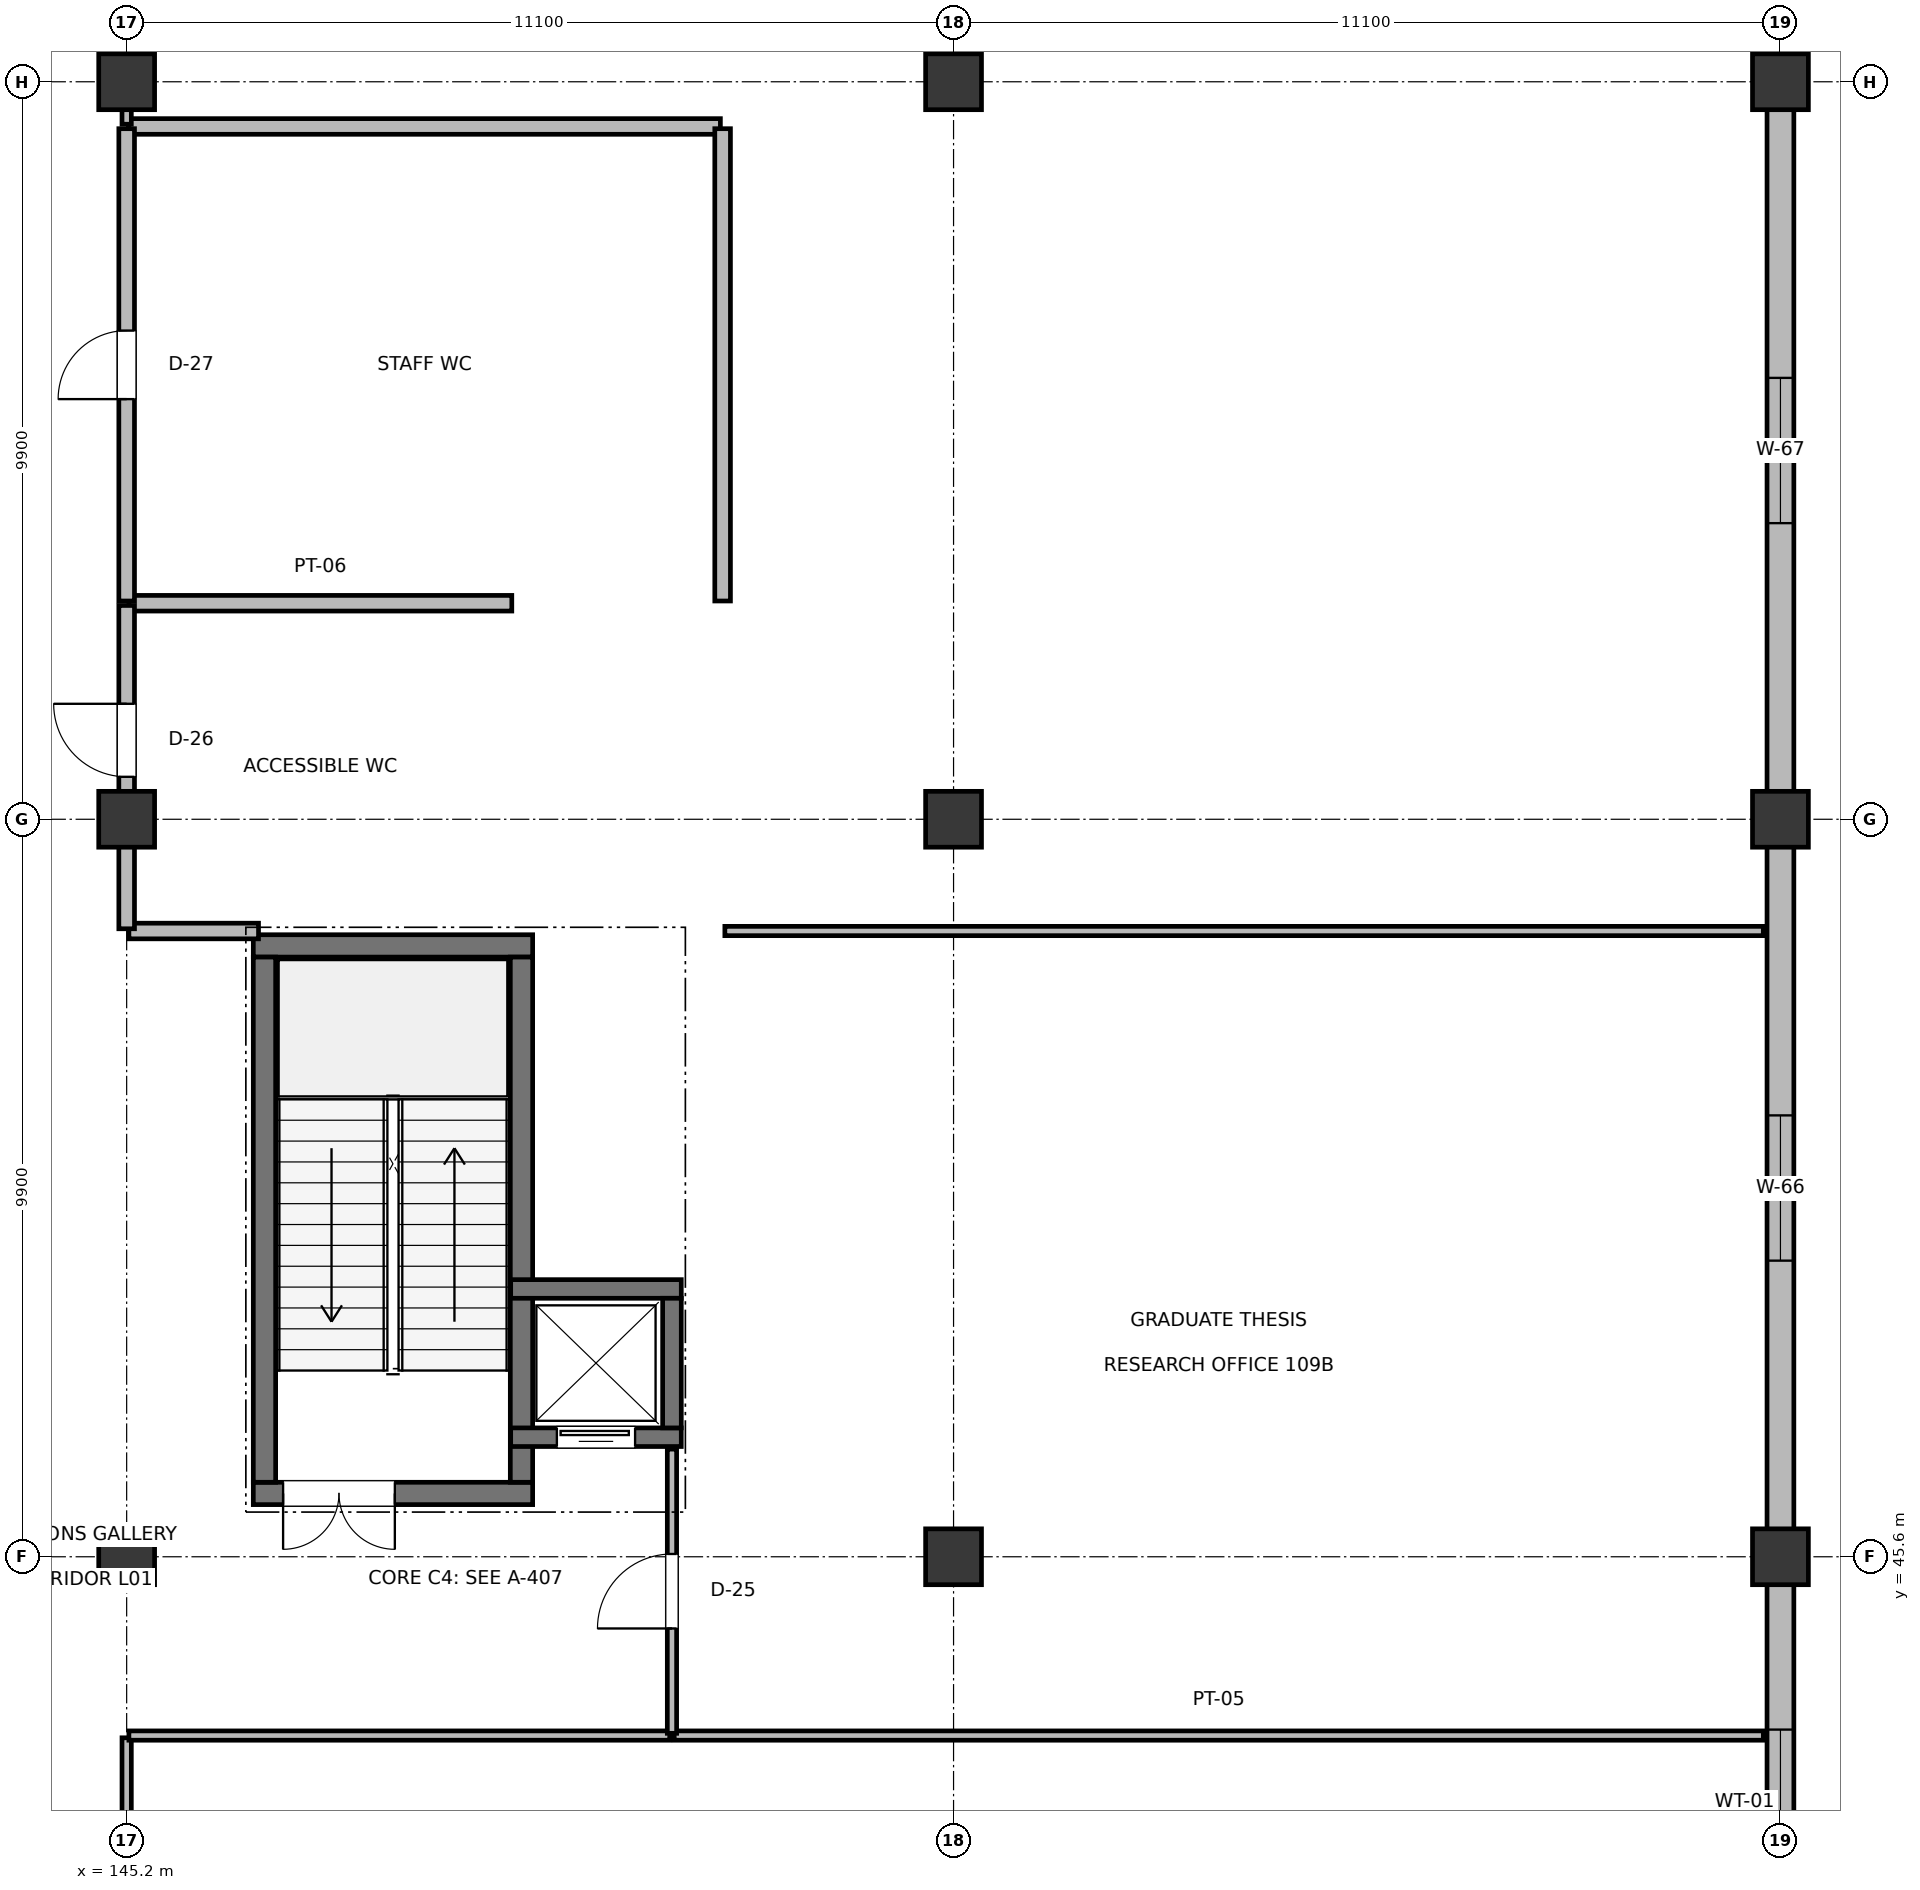
"""IFC4 building model, lengths in metres.
Left out: names, types, materials, properties, quantities, classifications, styles, units other than length and angle.
Written with IfcOpenShell. Run it as: python <this file> out.ifc"""

import sys

from ifc_helpers import new_model, si_unit, direction, frame, frame_2d, origin, origin_2d, place, context, subcontext, project, spatial, rectangle, extrude, element, fill, save


model = new_model("IFC4")
c1 = context("Model", 3, precision=1e-05, world=origin(), true_north=direction((0.0, 1.0)))
c2 = subcontext(c1, "Body", "Model", "MODEL_VIEW")
j1 = project(units=[si_unit("LENGTHUNIT", "METRE"), si_unit("PLANEANGLEUNIT", "RADIAN")], contexts=[c1])
p1 = place(None, origin())
s1 = spatial("IfcSite", under=j1, at=p1, CompositionType="ELEMENT")
p2 = place(p1, origin())
s2 = spatial("IfcBuilding", under=s1, at=p2, CompositionType="ELEMENT")
p3 = place(p2, frame((0.0, 0.0, 5.4)))
s3 = spatial("IfcBuildingStorey", under=s2, at=p3, CompositionType="ELEMENT", Elevation=5.4)
for number, where, z_axis, x_axis in (
    (1, (145.2, 45.6, 0.0), (0.0, 0.0, 1.0), (1.0, 0.0, 0.0)),
    (2, (145.2, 55.5, 0.0), (0.0, 0.0, 1.0), (1.0, 0.0, 0.0)),
    (3, (145.2, 65.4, 0.0), (0.0, 0.0, 1.0), (1.0, 0.0, 0.0)),
    (4, (156.3, 45.6, 0.0), (0.0, 0.0, 1.0), (1.0, 0.0, 0.0)),
    (5, (156.3, 55.5, 0.0), (0.0, 0.0, 1.0), (1.0, 0.0, 0.0)),
    (6, (156.3, 65.4, 0.0), (0.0, 0.0, 1.0), (1.0, 0.0, 0.0)),
    (7, (167.4, 45.6, 0.0), (0.0, 0.0, 1.0), (1.0, 0.0, 0.0)),
    (8, (167.4, 55.5, 0.0), (0.0, 0.0, 1.0), (1.0, 0.0, 0.0)),
    (9, (167.4, 65.4, 0.0), (0.0, 0.0, 1.0), (1.0, 0.0, 0.0)),
):
    element("IfcColumn", number, at=place(p3, frame(where, z_axis=z_axis, x_axis=x_axis)), inside=s3, PredefinedType="COLUMN", context=c2, shape_type="SweptSolid", body=[
        extrude(rectangle(XDim=0.75, YDim=0.75, at=origin_2d()), origin(), (0.0, 0.0, 1.0), 4.8),
    ])
p4 = place(p3, frame((167.4, 39.365, 0.0), z_axis=(0.0, 0.0, 1.0), x_axis=(0.0, 1.0, 0.0)))
e10 = element("IfcWall", 10, at=p4, inside=s3, PredefinedType="SOLIDWALL", context=c2, shape_type="SweptSolid", body=[
    extrude(rectangle(XDim=5.88, YDim=0.36, at=frame_2d((2.94, 0.0))), origin(), (0.0, 0.0, 1.0), 3.775),
])
p5 = place(p4, frame((1.965, 0.0, 0.85)))
e11 = element("IfcOpeningElement", 11, at=p5, cuts=e10, PredefinedType="OPENING", context=c2, shape_type="SweptSolid", body=[
    extrude(rectangle(XDim=1.95, YDim=1.15, at=frame_2d((0.975, 0.575))), frame((0.0, 0.19, 0.0), z_axis=(0.0, -1.0, 0.0), x_axis=(1.0, 0.0, 0.0)), (0.0, 0.0, 1.0), 0.38),
])
p6 = place(p3, frame((167.4, 45.965, 0.0), z_axis=(0.0, 0.0, 1.0), x_axis=(0.0, 1.0, 0.0)))
e12 = element("IfcWall", 12, at=p6, inside=s3, PredefinedType="SOLIDWALL", context=c2, shape_type="SweptSolid", body=[
    extrude(rectangle(XDim=9.17, YDim=0.36, at=frame_2d((4.585, 0.0))), origin(), (0.0, 0.0, 1.0), 3.775),
])
p7 = place(p6, frame((3.61, 0.0, 0.85)))
e13 = element("IfcOpeningElement", 13, at=p7, cuts=e12, PredefinedType="OPENING", context=c2, shape_type="SweptSolid", body=[
    extrude(rectangle(XDim=1.95, YDim=1.35, at=frame_2d((0.975, 0.675))), frame((0.0, 0.19, 0.0), z_axis=(0.0, -1.0, 0.0), x_axis=(1.0, 0.0, 0.0)), (0.0, 0.0, 1.0), 0.38),
])
p8 = place(p3, frame((167.4, 55.865, 0.0), z_axis=(0.0, 0.0, 1.0), x_axis=(0.0, 1.0, 0.0)))
e14 = element("IfcWall", 14, at=p8, inside=s3, PredefinedType="SOLIDWALL", context=c2, shape_type="SweptSolid", body=[
    extrude(rectangle(XDim=9.17, YDim=0.36, at=frame_2d((4.585, 0.0))), origin(), (0.0, 0.0, 1.0), 3.775),
])
p9 = place(p8, frame((3.61, 0.0, 0.85)))
e15 = element("IfcOpeningElement", 15, at=p9, cuts=e14, PredefinedType="OPENING", context=c2, shape_type="SweptSolid", body=[
    extrude(rectangle(XDim=1.95, YDim=1.55, at=frame_2d((0.975, 0.775))), frame((0.0, 0.19, 0.0), z_axis=(0.0, -1.0, 0.0), x_axis=(1.0, 0.0, 0.0)), (0.0, 0.0, 1.0), 0.38),
])
p10 = place(p3, frame((167.4, 65.765, 0.0), z_axis=(0.0, 0.0, 1.0), x_axis=(0.0, 1.0, 0.0)))
e16 = element("IfcWall", 16, at=p10, inside=s3, PredefinedType="SOLIDWALL", context=c2, shape_type="SweptSolid", body=[
    extrude(rectangle(XDim=10.07, YDim=0.36, at=frame_2d((5.035, 0.0))), origin(), (0.0, 0.0, 1.0), 3.775),
])
p11 = place(p10, frame((4.06, 0.0, 0.85)))
e17 = element("IfcOpeningElement", 17, at=p11, cuts=e16, PredefinedType="OPENING", context=c2, shape_type="SweptSolid", body=[
    extrude(rectangle(XDim=1.95, YDim=1.75, at=frame_2d((0.975, 0.875))), frame((0.0, 0.19, 0.0), z_axis=(0.0, -1.0, 0.0), x_axis=(1.0, 0.0, 0.0)), (0.0, 0.0, 1.0), 0.38),
])
p12 = place(p3, frame((146.9, 46.45, 0.0), z_axis=(0.0, 0.0, 1.0), x_axis=(1.0, 0.0, 0.0)))
e18 = element("IfcWall", 18, at=p12, inside=s3, PredefinedType="SHEAR", context=c2, shape_type="SweptSolid", body=[
    extrude(rectangle(XDim=3.75, YDim=0.3, at=frame_2d((1.875, 0.0))), origin(), (0.0, 0.0, 1.0), 4.58),
])
p13 = place(p12, frame((0.4, 0.0, 0.0)))
e19 = element("IfcOpeningElement", 19, at=p13, cuts=e18, PredefinedType="OPENING", context=c2, shape_type="SweptSolid", body=[
    extrude(rectangle(XDim=1.5, YDim=2.2, at=frame_2d((0.75, 1.1))), frame((0.0, 0.16, 0.0), z_axis=(0.0, -1.0, 0.0), x_axis=(1.0, 0.0, 0.0)), (0.0, 0.0, 1.0), 0.32),
])
p14 = place(p3, frame((146.9, 53.8, 0.0), z_axis=(0.0, 0.0, 1.0), x_axis=(1.0, 0.0, 0.0)))
e20 = element("IfcWall", 20, at=p14, inside=s3, PredefinedType="SHEAR", context=c2, shape_type="SweptSolid", body=[
    extrude(rectangle(XDim=3.75, YDim=0.3, at=frame_2d((1.875, 0.0))), origin(), (0.0, 0.0, 1.0), 4.58),
])
for number, where, z_axis, x_axis in (
    (21, (147.05, 46.6, 0.0), (0.0, 0.0, 1.0), (0.0, 1.0, 0.0)),
    (22, (150.5, 46.6, 0.0), (0.0, 0.0, 1.0), (0.0, 1.0, 0.0)),
):
    element("IfcWall", number, at=place(p3, frame(where, z_axis=z_axis, x_axis=x_axis)), inside=s3, PredefinedType="SHEAR", context=c2, shape_type="SweptSolid", body=[
        extrude(rectangle(XDim=7.05, YDim=0.3, at=frame_2d((3.525, 0.0))), origin(), (0.0, 0.0, 1.0), 4.58),
    ])
p15 = place(p3, frame((150.355, 47.205, 0.0), z_axis=(0.0, 0.0, 1.0), x_axis=(1.0, 0.0, 0.0)))
e23 = element("IfcWall", 23, at=p15, inside=s3, PredefinedType="SHEAR", context=c2, shape_type="SweptSolid", body=[
    extrude(rectangle(XDim=2.29, YDim=0.25, at=frame_2d((1.145, 0.0))), origin(), (0.0, 0.0, 1.0), 4.56),
])
p16 = place(p15, frame((0.62, 0.0, 0.0)))
e24 = element("IfcOpeningElement", 24, at=p16, cuts=e23, PredefinedType="OPENING", context=c2, shape_type="SweptSolid", body=[
    extrude(rectangle(XDim=1.05, YDim=2.15, at=frame_2d((0.525, 1.075))), frame((0.0, 0.135, 0.0), z_axis=(0.0, -1.0, 0.0), x_axis=(1.0, 0.0, 0.0)), (0.0, 0.0, 1.0), 0.27),
])
p17 = place(p3, frame((150.355, 49.195, 0.0), z_axis=(0.0, 0.0, 1.0), x_axis=(1.0, 0.0, 0.0)))
e25 = element("IfcWall", 25, at=p17, inside=s3, PredefinedType="SHEAR", context=c2, shape_type="SweptSolid", body=[
    extrude(rectangle(XDim=2.29, YDim=0.25, at=frame_2d((1.145, 0.0))), origin(), (0.0, 0.0, 1.0), 4.56),
])
p18 = place(p3, frame((152.52, 47.33, 0.0), z_axis=(0.0, 0.0, 1.0), x_axis=(0.0, 1.0, 0.0)))
e26 = element("IfcWall", 26, at=p18, inside=s3, PredefinedType="SHEAR", context=c2, shape_type="SweptSolid", body=[
    extrude(rectangle(XDim=1.74, YDim=0.25, at=frame_2d((0.87, 0.0))), origin(), (0.0, 0.0, 1.0), 4.56),
])
p19 = place(p3, frame((152.55, 43.2, 0.0), z_axis=(0.0, 0.0, 1.0), x_axis=(1.0, 0.0, 0.0)))
e27 = element("IfcWall", 27, at=p19, inside=s3, PredefinedType="PARTITIONING", context=c2, shape_type="SweptSolid", body=[
    extrude(rectangle(XDim=14.62, YDim=0.125, at=frame_2d((7.31, 0.0))), origin(), (0.0, 0.0, 1.0), 3.775),
])
p20 = place(p3, frame((145.2, 12.23, 0.0), z_axis=(0.0, 0.0, 1.0), x_axis=(0.0, 1.0, 0.0)))
e28 = element("IfcWall", 28, at=p20, inside=s3, PredefinedType="PARTITIONING", context=c2, shape_type="SweptSolid", body=[
    extrude(rectangle(XDim=30.94, YDim=0.125, at=frame_2d((15.47, 0.0))), origin(), (0.0, 0.0, 1.0), 3.625),
])
p21 = place(p20, frame((14.97, 0.0, 0.0)))
e29 = element("IfcOpeningElement", 29, at=p21, cuts=e28, PredefinedType="OPENING", context=c2, shape_type="SweptSolid", body=[
    extrude(rectangle(XDim=1.0, YDim=2.15, at=frame_2d((0.5, 1.075))), frame((0.0, 0.073, 0.0), z_axis=(0.0, -1.0, 0.0), x_axis=(1.0, 0.0, 0.0)), (0.0, 0.0, 1.0), 0.145),
])
p22 = place(p3, frame((145.23, 43.2, 0.0), z_axis=(0.0, 0.0, 1.0), x_axis=(1.0, 0.0, 0.0)))
e30 = element("IfcWall", 30, at=p22, inside=s3, PredefinedType="PARTITIONING", context=c2, shape_type="SweptSolid", body=[
    extrude(rectangle(XDim=7.26, YDim=0.125, at=frame_2d((3.63, 0.0))), origin(), (0.0, 0.0, 1.0), 3.825),
])
p23 = place(p3, frame((153.23, 54.0, 0.0), z_axis=(0.0, 0.0, 1.0), x_axis=(1.0, 0.0, 0.0)))
e31 = element("IfcWall", 31, at=p23, inside=s3, PredefinedType="PARTITIONING", context=c2, shape_type="SweptSolid", body=[
    extrude(rectangle(XDim=13.94, YDim=0.125, at=frame_2d((6.97, 0.0))), origin(), (0.0, 0.0, 1.0), 3.625),
])
p24 = place(p3, frame((152.52, 43.23, 0.0), z_axis=(0.0, 0.0, 1.0), x_axis=(0.0, 1.0, 0.0)))
e32 = element("IfcWall", 32, at=p24, inside=s3, PredefinedType="PARTITIONING", context=c2, shape_type="SweptSolid", body=[
    extrude(rectangle(XDim=3.815, YDim=0.125, at=frame_2d((1.907, 0.0))), origin(), (0.0, 0.0, 1.0), 3.695),
])
p25 = place(p24, frame((1.407, 0.0, 0.0)))
e33 = element("IfcOpeningElement", 33, at=p25, cuts=e32, PredefinedType="OPENING", context=c2, shape_type="SweptSolid", body=[
    extrude(rectangle(XDim=1.0, YDim=2.15, at=frame_2d((0.5, 1.075))), frame((0.0, 0.073, 0.0), z_axis=(0.0, -1.0, 0.0), x_axis=(1.0, 0.0, 0.0)), (0.0, 0.0, 1.0), 0.145),
])
p26 = place(p3, frame((145.23, 58.4, 0.0), z_axis=(0.0, 0.0, 1.0), x_axis=(1.0, 0.0, 0.0)))
e34 = element("IfcWall", 34, at=p26, inside=s3, PredefinedType="PLUMBINGWALL", context=c2, shape_type="SweptSolid", body=[
    extrude(rectangle(XDim=5.14, YDim=0.21, at=frame_2d((2.57, 0.0))), origin(), (0.0, 0.0, 1.0), 3.625),
])
p27 = place(p3, frame((145.23, 54.0, 0.0), z_axis=(0.0, 0.0, 1.0), x_axis=(1.0, 0.0, 0.0)))
e35 = element("IfcWall", 35, at=p27, inside=s3, PredefinedType="PLUMBINGWALL", context=c2, shape_type="SweptSolid", body=[
    extrude(rectangle(XDim=1.74, YDim=0.21, at=frame_2d((0.87, 0.0))), origin(), (0.0, 0.0, 1.0), 3.625),
])
p28 = place(p3, frame((145.2, 54.03, 0.0), z_axis=(0.0, 0.0, 1.0), x_axis=(0.0, 1.0, 0.0)))
e36 = element("IfcWall", 36, at=p28, inside=s3, PredefinedType="PLUMBINGWALL", context=c2, shape_type="SweptSolid", body=[
    extrude(rectangle(XDim=4.34, YDim=0.21, at=frame_2d((2.17, 0.0))), origin(), (0.0, 0.0, 1.0), 3.625),
])
p29 = place(p28, frame((2.04, 0.0, 0.0)))
e37 = element("IfcOpeningElement", 37, at=p29, cuts=e36, PredefinedType="OPENING", context=c2, shape_type="SweptSolid", body=[
    extrude(rectangle(XDim=0.98, YDim=2.1, at=frame_2d((0.49, 1.05))), frame((0.0, 0.115, 0.0), z_axis=(0.0, -1.0, 0.0), x_axis=(1.0, 0.0, 0.0)), (0.0, 0.0, 1.0), 0.23),
])
p30 = place(p3, frame((145.23, 64.8, 0.0), z_axis=(0.0, 0.0, 1.0), x_axis=(1.0, 0.0, 0.0)))
e38 = element("IfcWall", 38, at=p30, inside=s3, PredefinedType="PLUMBINGWALL", context=c2, shape_type="SweptSolid", body=[
    extrude(rectangle(XDim=7.94, YDim=0.21, at=frame_2d((3.97, 0.0))), origin(), (0.0, 0.0, 1.0), 3.625),
])
p31 = place(p3, frame((153.2, 58.43, 0.0), z_axis=(0.0, 0.0, 1.0), x_axis=(0.0, 1.0, 0.0)))
e39 = element("IfcWall", 39, at=p31, inside=s3, PredefinedType="PLUMBINGWALL", context=c2, shape_type="SweptSolid", body=[
    extrude(rectangle(XDim=6.34, YDim=0.21, at=frame_2d((3.17, 0.0))), origin(), (0.0, 0.0, 1.0), 4.48),
])
p32 = place(p3, frame((145.2, 58.43, 0.0), z_axis=(0.0, 0.0, 1.0), x_axis=(0.0, 1.0, 0.0)))
e40 = element("IfcWall", 40, at=p32, inside=s3, PredefinedType="PLUMBINGWALL", context=c2, shape_type="SweptSolid", body=[
    extrude(rectangle(XDim=6.34, YDim=0.21, at=frame_2d((3.17, 0.0))), origin(), (0.0, 0.0, 1.0), 3.625),
])
p33 = place(p32, frame((2.71, 0.0, 0.0)))
e41 = element("IfcOpeningElement", 41, at=p33, cuts=e40, PredefinedType="OPENING", context=c2, shape_type="SweptSolid", body=[
    extrude(rectangle(XDim=0.92, YDim=2.1, at=frame_2d((0.46, 1.05))), frame((0.0, 0.115, 0.0), z_axis=(0.0, -1.0, 0.0), x_axis=(1.0, 0.0, 0.0)), (0.0, 0.0, 1.0), 0.23),
])
p34 = place(p3, frame((145.2, 64.83, 0.0), z_axis=(0.0, 0.0, 1.0), x_axis=(0.0, 1.0, 0.0)))
e42 = element("IfcWall", 42, at=p34, inside=s3, PredefinedType="PARTITIONING", context=c2, shape_type="SweptSolid", body=[
    extrude(rectangle(XDim=11.14, YDim=0.125, at=frame_2d((5.57, 0.0))), origin(), (0.0, 0.0, 1.0), 3.625),
])
p35 = place(p34, frame((5.03, 0.0, 0.0)))
e43 = element("IfcOpeningElement", 43, at=p35, cuts=e42, PredefinedType="OPENING", context=c2, shape_type="SweptSolid", body=[
    extrude(rectangle(XDim=1.08, YDim=2.15, at=frame_2d((0.54, 1.075))), frame((0.0, 0.073, 0.0), z_axis=(0.0, -1.0, 0.0), x_axis=(1.0, 0.0, 0.0)), (0.0, 0.0, 1.0), 0.145),
])
p36 = place(p5, frame((1.95, 0.0, 0.0), z_axis=(0.0, 0.0, 1.0), x_axis=(-1.0, 0.0, 0.0)))
e44 = element("IfcWindow", 44, at=p36, inside=s3, PartitioningType="DOUBLE_PANEL_VERTICAL", PredefinedType="WINDOW", context=c2, shape_type="SweptSolid", body=[
    extrude(rectangle(XDim=1.95, YDim=1.15, at=frame_2d((0.975, 0.575))), frame((0.0, 0.03, 0.0), z_axis=(0.0, -1.0, 0.0), x_axis=(1.0, 0.0, 0.0)), (0.0, 0.0, 1.0), 0.06),
])
fill(e11, e44)
p37 = place(p7, frame((1.95, 0.0, 0.0), z_axis=(0.0, 0.0, 1.0), x_axis=(-1.0, 0.0, 0.0)))
e45 = element("IfcWindow", 45, at=p37, inside=s3, PartitioningType="DOUBLE_PANEL_VERTICAL", PredefinedType="WINDOW", context=c2, shape_type="SweptSolid", body=[
    extrude(rectangle(XDim=1.95, YDim=1.35, at=frame_2d((0.975, 0.675))), frame((0.0, 0.03, 0.0), z_axis=(0.0, -1.0, 0.0), x_axis=(1.0, 0.0, 0.0)), (0.0, 0.0, 1.0), 0.06),
])
fill(e13, e45)
p38 = place(p9, frame((1.95, 0.0, 0.0), z_axis=(0.0, 0.0, 1.0), x_axis=(-1.0, 0.0, 0.0)))
e46 = element("IfcWindow", 46, at=p38, inside=s3, PartitioningType="DOUBLE_PANEL_VERTICAL", PredefinedType="WINDOW", context=c2, shape_type="SweptSolid", body=[
    extrude(rectangle(XDim=1.95, YDim=1.55, at=frame_2d((0.975, 0.775))), frame((0.0, 0.03, 0.0), z_axis=(0.0, -1.0, 0.0), x_axis=(1.0, 0.0, 0.0)), (0.0, 0.0, 1.0), 0.06),
])
fill(e15, e46)
p39 = place(p13, frame((1.5, 0.0, 0.0), z_axis=(0.0, 0.0, 1.0), x_axis=(-1.0, 0.0, 0.0)))
e47 = element("IfcDoor", 47, at=p39, inside=s3, OperationType="DOUBLE_DOOR_SINGLE_SWING", PredefinedType="DOOR", context=c2, shape_type="SweptSolid", body=[
    extrude(rectangle(XDim=1.5, YDim=2.2, at=frame_2d((0.75, 1.1))), frame((0.0, 0.025, 0.0), z_axis=(0.0, -1.0, 0.0), x_axis=(1.0, 0.0, 0.0)), (0.0, 0.0, 1.0), 0.05),
])
fill(e19, e47)
p40 = place(p16, frame((1.05, 0.0, 0.0), z_axis=(0.0, 0.0, 1.0), x_axis=(-1.0, 0.0, 0.0)))
e48 = element("IfcDoor", 48, at=p40, inside=s3, OperationType="SLIDING_TO_RIGHT", PredefinedType="DOOR", context=c2, shape_type="SweptSolid", body=[
    extrude(rectangle(XDim=1.05, YDim=2.15, at=frame_2d((0.525, 1.075))), frame((0.0, 0.025, 0.0), z_axis=(0.0, -1.0, 0.0), x_axis=(1.0, 0.0, 0.0)), (0.0, 0.0, 1.0), 0.05),
])
fill(e24, e48)
p41 = place(p25, origin())
e49 = element("IfcDoor", 49, at=p41, inside=s3, OperationType="SINGLE_SWING_LEFT", PredefinedType="DOOR", context=c2, shape_type="SweptSolid", body=[
    extrude(rectangle(XDim=1.0, YDim=2.15, at=frame_2d((0.5, 1.075))), frame((0.0, 0.025, 0.0), z_axis=(0.0, -1.0, 0.0), x_axis=(1.0, 0.0, 0.0)), (0.0, 0.0, 1.0), 0.05),
])
fill(e33, e49)
p42 = place(p29, origin())
e50 = element("IfcDoor", 50, at=p42, inside=s3, OperationType="SINGLE_SWING_RIGHT", PredefinedType="DOOR", context=c2, shape_type="SweptSolid", body=[
    extrude(rectangle(XDim=0.98, YDim=2.1, at=frame_2d((0.49, 1.05))), frame((0.0, 0.025, 0.0), z_axis=(0.0, -1.0, 0.0), x_axis=(1.0, 0.0, 0.0)), (0.0, 0.0, 1.0), 0.05),
])
fill(e37, e50)
p43 = place(p33, origin())
e51 = element("IfcDoor", 51, at=p43, inside=s3, OperationType="SINGLE_SWING_LEFT", PredefinedType="DOOR", context=c2, shape_type="SweptSolid", body=[
    extrude(rectangle(XDim=0.92, YDim=2.1, at=frame_2d((0.46, 1.05))), frame((0.0, 0.025, 0.0), z_axis=(0.0, -1.0, 0.0), x_axis=(1.0, 0.0, 0.0)), (0.0, 0.0, 1.0), 0.05),
])
fill(e41, e51)
save(model, sys.argv[1])
